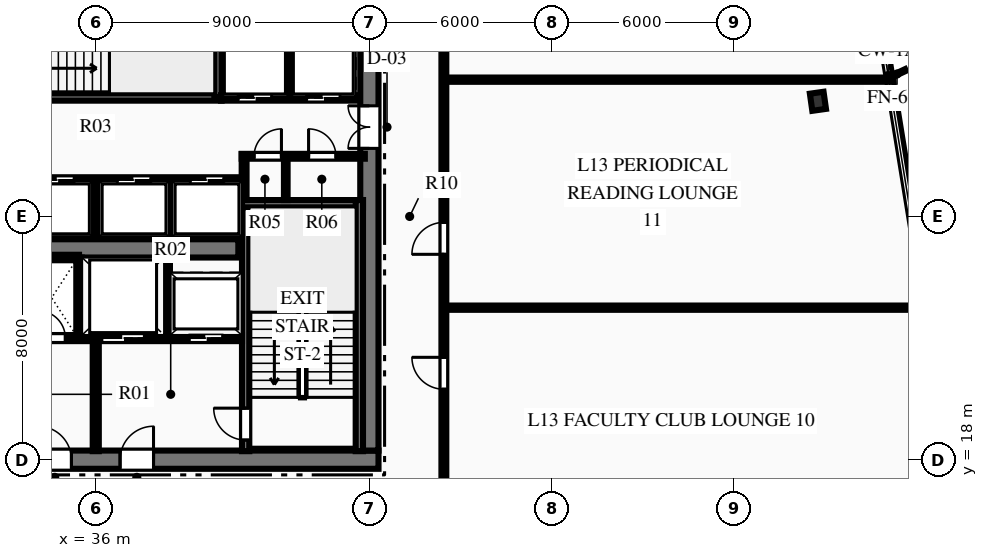
"""IFC4 building model, lengths in metres.
Left out: names, types, materials, properties, quantities, classifications, styles, units other than length and angle.
Written with IfcOpenShell. Run it as: python <this file> out.ifc"""

import sys

from ifc_helpers import new_model, si_unit, direction, frame, frame_2d, origin, origin_2d, place, context, subcontext, project, spatial, rectangle, i_section, extrude, element, fill, save


model = new_model("IFC4")
c1 = context("Model", 3, precision=1e-05, world=origin(), true_north=direction((0.0, 1.0)))
c2 = subcontext(c1, "Body", "Model", "MODEL_VIEW")
j1 = project(units=[si_unit("LENGTHUNIT", "METRE"), si_unit("PLANEANGLEUNIT", "RADIAN")], contexts=[c1])
p1 = place(None, origin())
s1 = spatial("IfcSite", under=j1, at=p1, CompositionType="ELEMENT")
p2 = place(p1, origin())
s2 = spatial("IfcBuilding", under=s1, at=p2, CompositionType="ELEMENT")
p3 = place(p2, frame((0.0, 0.0, 58.95)))
s3 = spatial("IfcBuildingStorey", under=s2, at=p3, CompositionType="ELEMENT", Elevation=58.95)
p4 = place(p3, frame((26.7, 18.0, 0.0), z_axis=(0.0, 0.0, 1.0), x_axis=(1.0, 0.0, 0.0)))
e1 = element("IfcWall", 1, at=p4, inside=s3, PredefinedType="SHEAR", context=c2, shape_type="SweptSolid", body=[
    extrude(rectangle(XDim=18.6, YDim=0.6, at=frame_2d((9.3, 0.0))), origin(), (0.0, 0.0, 1.0), 3.75),
])
p5 = place(p4, frame((7.4, 0.0, 0.0)))
e2 = element("IfcOpeningElement", 2, at=p5, cuts=e1, PredefinedType="OPENING", context=c2, shape_type="SweptSolid", body=[
    extrude(rectangle(XDim=1.1, YDim=2.15, at=frame_2d((0.55, 1.075))), frame((0.0, 0.31, 0.0), z_axis=(0.0, -1.0, 0.0), x_axis=(1.0, 0.0, 0.0)), (0.0, 0.0, 1.0), 0.62),
])
p6 = place(p4, frame((10.1, 0.0, 0.0)))
e3 = element("IfcOpeningElement", 3, at=p6, cuts=e1, PredefinedType="OPENING", context=c2, shape_type="SweptSolid", body=[
    extrude(rectangle(XDim=1.1, YDim=2.15, at=frame_2d((0.55, 1.075))), frame((0.0, 0.31, 0.0), z_axis=(0.0, -1.0, 0.0), x_axis=(1.0, 0.0, 0.0)), (0.0, 0.0, 1.0), 0.62),
])
p7 = place(p3, frame((45.0, 18.3, 0.0), z_axis=(0.0, 0.0, 1.0), x_axis=(0.0, 1.0, 0.0)))
e4 = element("IfcWall", 4, at=p7, inside=s3, PredefinedType="SHEAR", context=c2, shape_type="SweptSolid", body=[
    extrude(rectangle(XDim=15.4, YDim=0.6, at=frame_2d((7.7, 0.0))), origin(), (0.0, 0.0, 1.0), 3.75),
])
p8 = place(p7, frame((9.94, 0.0, 0.0)))
e5 = element("IfcOpeningElement", 5, at=p8, cuts=e4, PredefinedType="OPENING", context=c2, shape_type="SweptSolid", body=[
    extrude(rectangle(XDim=1.4, YDim=2.2, at=frame_2d((0.7, 1.1))), frame((0.0, 0.31, 0.0), z_axis=(0.0, -1.0, 0.0), x_axis=(1.0, 0.0, 0.0)), (0.0, 0.0, 1.0), 0.62),
])
p9 = place(p3, frame((31.31, 24.95, 0.0), z_axis=(0.0, 0.0, 1.0), x_axis=(1.0, 0.0, 0.0)))
e6 = element("IfcWall", 6, at=p9, inside=s3, PredefinedType="SHEAR", context=c2, shape_type="SweptSolid", body=[
    extrude(rectangle(XDim=9.38, YDim=0.6, at=frame_2d((4.69, 0.0))), origin(), (0.0, 0.0, 1.0), 3.75),
])
p10 = place(p3, frame((40.93, 18.28, 0.0), z_axis=(0.0, 0.0, 1.0), x_axis=(0.0, 1.0, 0.0)))
e7 = element("IfcWall", 7, at=p10, inside=s3, PredefinedType="SHEAR", context=c2, shape_type="SweptSolid", body=[
    extrude(rectangle(XDim=8.26, YDim=0.24, at=frame_2d((4.13, 0.0))), origin(), (0.0, 0.0, 1.0), 3.75),
])
p11 = place(p10, frame((0.365, 0.0, 0.0)))
e8 = element("IfcOpeningElement", 8, at=p11, cuts=e7, PredefinedType="OPENING", context=c2, shape_type="SweptSolid", body=[
    extrude(rectangle(XDim=1.05, YDim=2.15, at=frame_2d((0.525, 1.075))), frame((0.0, 0.13, 0.0), z_axis=(0.0, -1.0, 0.0), x_axis=(1.0, 0.0, 0.0)), (0.0, 0.0, 1.0), 0.26),
])
p12 = place(p3, frame((40.81, 26.42, 0.0), z_axis=(0.0, 0.0, 1.0), x_axis=(1.0, 0.0, 0.0)))
e9 = element("IfcWall", 9, at=p12, inside=s3, PredefinedType="SHEAR", context=c2, shape_type="SweptSolid", body=[
    extrude(rectangle(XDim=3.98, YDim=0.24, at=frame_2d((1.99, 0.0))), origin(), (0.0, 0.0, 1.0), 3.75),
])
p13 = place(p3, frame((44.67, 18.28, 0.0), z_axis=(0.0, 0.0, 1.0), x_axis=(0.0, 1.0, 0.0)))
e10 = element("IfcWall", 10, at=p13, inside=s3, PredefinedType="SHEAR", context=c2, shape_type="SweptSolid", body=[
    extrude(rectangle(XDim=8.26, YDim=0.24, at=frame_2d((4.13, 0.0))), origin(), (0.0, 0.0, 1.0), 3.75),
])
p14 = place(p3, frame((31.76, 29.93, 0.0), z_axis=(0.0, 0.0, 1.0), x_axis=(1.0, 0.0, 0.0)))
e11 = element("IfcWall", 11, at=p14, inside=s3, PredefinedType="SHEAR", context=c2, shape_type="SweptSolid", body=[
    extrude(rectangle(XDim=8.38, YDim=0.24, at=frame_2d((4.19, 0.0))), origin(), (0.0, 0.0, 1.0), 3.75),
])
p15 = place(p14, frame((0.565, 0.0, 0.0)))
e12 = element("IfcOpeningElement", 12, at=p15, cuts=e11, PredefinedType="OPENING", context=c2, shape_type="SweptSolid", body=[
    extrude(rectangle(XDim=1.05, YDim=2.15, at=frame_2d((0.525, 1.075))), frame((0.0, 0.13, 0.0), z_axis=(0.0, -1.0, 0.0), x_axis=(1.0, 0.0, 0.0)), (0.0, 0.0, 1.0), 0.26),
])
p16 = place(p3, frame((40.02, 29.93, 0.0), z_axis=(0.0, 0.0, 1.0), x_axis=(0.0, 1.0, 0.0)))
e13 = element("IfcWall", 13, at=p16, inside=s3, PredefinedType="SHEAR", context=c2, shape_type="SweptSolid", body=[
    extrude(rectangle(XDim=3.85, YDim=0.24, at=frame_2d((1.925, 0.0))), origin(), (0.0, 0.0, 1.0), 3.75),
])
p17 = place(p3, frame((59.753, 29.789, 0.0), z_axis=(0.0, 0.0, 1.0), x_axis=(0.990146240249, 0.140037219771, 0.0)))
e14 = element("IfcColumn", 14, at=p17, inside=s3, PredefinedType="COLUMN", context=c2, shape_type="SweptSolid", body=[
    extrude(i_section(OverallWidth=0.454, OverallDepth=0.569, WebThickness=0.078, FlangeThickness=0.125, at=origin_2d()), origin(), (0.0, 0.0, 1.0), 3.75),
])
p18 = place(p3, frame((36.0, 18.28, 0.0), z_axis=(0.0, 0.0, 1.0), x_axis=(0.0, 1.0, 0.0)))
e15 = element("IfcWall", 15, at=p18, inside=s3, PredefinedType="PARTITIONING", context=c2, shape_type="SweptSolid", body=[
    extrude(rectangle(XDim=3.77, YDim=0.2, at=frame_2d((1.885, 0.0))), origin(), (0.0, 0.0, 1.0), 3.44),
])
p19 = place(p3, frame((31.19, 22.0, 0.0), z_axis=(0.0, 0.0, 1.0), x_axis=(1.0, 0.0, 0.0)))
e16 = element("IfcWall", 16, at=p19, inside=s3, PredefinedType="PARTITIONING", context=c2, shape_type="SweptSolid", body=[
    extrude(rectangle(XDim=4.69, YDim=0.2, at=frame_2d((2.345, 0.0))), origin(), (0.0, 0.0, 1.0), 3.44),
])
p20 = place(p19, frame((2.91, 0.0, 0.0)))
e17 = element("IfcOpeningElement", 17, at=p20, cuts=e16, PredefinedType="OPENING", context=c2, shape_type="SweptSolid", body=[
    extrude(rectangle(XDim=0.9, YDim=2.15, at=frame_2d((0.45, 1.075))), frame((0.0, 0.11, 0.0), z_axis=(0.0, -1.0, 0.0), x_axis=(1.0, 0.0, 0.0)), (0.0, 0.0, 1.0), 0.22),
])
p21 = place(p19, frame((0.635, 0.0, 0.0)))
e18 = element("IfcOpeningElement", 18, at=p21, cuts=e16, PredefinedType="OPENING", context=c2, shape_type="SweptSolid", body=[
    extrude(rectangle(XDim=1.1, YDim=2.15, at=frame_2d((0.55, 1.075))), frame((0.0, 0.11, 0.0), z_axis=(0.0, -1.0, 0.0), x_axis=(1.0, 0.0, 0.0)), (0.0, 0.0, 1.0), 0.22),
])
p22 = place(p3, frame((36.12, 22.0, 0.0), z_axis=(0.0, 0.0, 1.0), x_axis=(1.0, 0.0, 0.0)))
e19 = element("IfcWall", 19, at=p22, inside=s3, PredefinedType="PARTITIONING", context=c2, shape_type="SweptSolid", body=[
    extrude(rectangle(XDim=4.69, YDim=0.2, at=frame_2d((2.345, 0.0))), origin(), (0.0, 0.0, 1.0), 3.44),
])
p23 = place(p22, frame((2.955, 0.0, 0.0)))
e20 = element("IfcOpeningElement", 20, at=p23, cuts=e19, PredefinedType="OPENING", context=c2, shape_type="SweptSolid", body=[
    extrude(rectangle(XDim=1.1, YDim=2.15, at=frame_2d((0.55, 1.075))), frame((0.0, 0.11, 0.0), z_axis=(0.0, -1.0, 0.0), x_axis=(1.0, 0.0, 0.0)), (0.0, 0.0, 1.0), 0.22),
])
p24 = place(p22, frame((0.08, 0.0, 0.0)))
e21 = element("IfcOpeningElement", 21, at=p24, cuts=e19, PredefinedType="OPENING", context=c2, shape_type="SweptSolid", body=[
    extrude(rectangle(XDim=1.4, YDim=2.2, at=frame_2d((0.7, 1.1))), frame((0.0, 0.11, 0.0), z_axis=(0.0, -1.0, 0.0), x_axis=(1.0, 0.0, 0.0)), (0.0, 0.0, 1.0), 0.22),
])
p25 = place(p3, frame((35.45, 22.05, 0.0), z_axis=(0.0, 0.0, 1.0), x_axis=(0.0, 1.0, 0.0)))
e22 = element("IfcWall", 22, at=p25, inside=s3, PredefinedType="PARTITIONING", context=c2, shape_type="SweptSolid", body=[
    extrude(rectangle(XDim=2.6, YDim=0.18, at=frame_2d((1.3, 0.0))), origin(), (0.0, 0.0, 1.0), 3.44),
])
p26 = place(p3, frame((33.65, 24.65, 0.0), z_axis=(0.0, 0.0, 1.0), x_axis=(1.0, 0.0, 0.0)))
e23 = element("IfcWall", 23, at=p26, inside=s3, PredefinedType="PARTITIONING", context=c2, shape_type="SweptSolid", body=[
    extrude(rectangle(XDim=1.8, YDim=0.18, at=frame_2d((0.9, 0.0))), origin(), (0.0, 0.0, 1.0), 3.44),
])
p27 = place(p3, frame((38.35, 22.05, 0.0), z_axis=(0.0, 0.0, 1.0), x_axis=(0.0, 1.0, 0.0)))
e24 = element("IfcWall", 24, at=p27, inside=s3, PredefinedType="PARTITIONING", context=c2, shape_type="SweptSolid", body=[
    extrude(rectangle(XDim=2.6, YDim=0.18, at=frame_2d((1.3, 0.0))), origin(), (0.0, 0.0, 1.0), 3.44),
])
p28 = place(p3, frame((40.8, 27.98, 0.0), z_axis=(0.0, 0.0, 1.0), x_axis=(1.0, 0.0, 0.0)))
e25 = element("IfcWall", 25, at=p28, inside=s3, PredefinedType="PARTITIONING", context=c2, shape_type="SweptSolid", body=[
    extrude(rectangle(XDim=4.05, YDim=0.16, at=frame_2d((2.025, 0.0))), origin(), (0.0, 0.0, 1.0), 3.44),
])
p29 = place(p28, frame((0.407, 0.0, 0.0)))
e26 = element("IfcOpeningElement", 26, at=p29, cuts=e25, PredefinedType="OPENING", context=c2, shape_type="SweptSolid", body=[
    extrude(rectangle(XDim=0.9, YDim=2.15, at=frame_2d((0.45, 1.075))), frame((0.0, 0.09, 0.0), z_axis=(0.0, -1.0, 0.0), x_axis=(1.0, 0.0, 0.0)), (0.0, 0.0, 1.0), 0.18),
])
p30 = place(p28, frame((2.2, 0.0, 0.0)))
e27 = element("IfcOpeningElement", 27, at=p30, cuts=e25, PredefinedType="OPENING", context=c2, shape_type="SweptSolid", body=[
    extrude(rectangle(XDim=0.9, YDim=2.15, at=frame_2d((0.45, 1.075))), frame((0.0, 0.09, 0.0), z_axis=(0.0, -1.0, 0.0), x_axis=(1.0, 0.0, 0.0)), (0.0, 0.0, 1.0), 0.18),
])
p31 = place(p3, frame((40.88, 26.54, 0.0), z_axis=(0.0, 0.0, 1.0), x_axis=(0.0, 1.0, 0.0)))
e28 = element("IfcWall", 28, at=p31, inside=s3, PredefinedType="PARTITIONING", context=c2, shape_type="SweptSolid", body=[
    extrude(rectangle(XDim=1.51, YDim=0.16, at=frame_2d((0.755, 0.0))), origin(), (0.0, 0.0, 1.0), 3.44),
])
p32 = place(p3, frame((42.25, 26.54, 0.0), z_axis=(0.0, 0.0, 1.0), x_axis=(0.0, 1.0, 0.0)))
e29 = element("IfcWall", 29, at=p32, inside=s3, PredefinedType="PARTITIONING", context=c2, shape_type="SweptSolid", body=[
    extrude(rectangle(XDim=1.44, YDim=0.12, at=frame_2d((0.72, 0.0))), origin(), (0.0, 0.0, 1.0), 3.44),
])
p33 = place(p3, frame((40.12, 29.9, 0.0), z_axis=(0.0, 0.0, 1.0), x_axis=(1.0, 0.0, 0.0)))
e30 = element("IfcWall", 30, at=p33, inside=s3, PredefinedType="PARTITIONING", context=c2, shape_type="SweptSolid", body=[
    extrude(rectangle(XDim=4.43, YDim=0.18, at=frame_2d((2.215, 0.0))), origin(), (0.0, 0.0, 1.0), 3.44),
])
p34 = place(p33, frame((0.565, 0.0, 0.0)))
e31 = element("IfcOpeningElement", 31, at=p34, cuts=e30, PredefinedType="OPENING", context=c2, shape_type="SweptSolid", body=[
    extrude(rectangle(XDim=1.1, YDim=2.15, at=frame_2d((0.55, 1.075))), frame((0.0, 0.1, 0.0), z_axis=(0.0, -1.0, 0.0), x_axis=(1.0, 0.0, 0.0)), (0.0, 0.0, 1.0), 0.2),
])
p35 = place(p33, frame((2.815, 0.0, 0.0)))
e32 = element("IfcOpeningElement", 32, at=p35, cuts=e30, PredefinedType="OPENING", context=c2, shape_type="SweptSolid", body=[
    extrude(rectangle(XDim=1.1, YDim=2.15, at=frame_2d((0.55, 1.075))), frame((0.0, 0.1, 0.0), z_axis=(0.0, -1.0, 0.0), x_axis=(1.0, 0.0, 0.0)), (0.0, 0.0, 1.0), 0.2),
])
p36 = place(p3, frame((42.37, 29.9, 0.0), z_axis=(0.0, 0.0, 1.0), x_axis=(0.0, 1.0, 0.0)))
e33 = element("IfcWall", 33, at=p36, inside=s3, PredefinedType="PARTITIONING", context=c2, shape_type="SweptSolid", body=[
    extrude(rectangle(XDim=3.75, YDim=0.18, at=frame_2d((1.875, 0.0))), origin(), (0.0, 0.0, 1.0), 3.44),
])
p37 = place(p3, frame((31.2, 27.2, 0.0), z_axis=(0.0, 0.0, 1.0), x_axis=(1.0, 0.0, 0.0)))
e34 = element("IfcWall", 34, at=p37, inside=s3, PredefinedType="PARTITIONING", context=c2, shape_type="SweptSolid", body=[
    extrude(rectangle(XDim=9.6, YDim=0.18, at=frame_2d((4.8, 0.0))), origin(), (0.0, 0.0, 1.0), 3.44),
])
p38 = place(p37, frame((0.59, 0.0, 0.0)))
e35 = element("IfcOpeningElement", 35, at=p38, cuts=e34, PredefinedType="OPENING", context=c2, shape_type="SweptSolid", body=[
    extrude(rectangle(XDim=1.1, YDim=2.15, at=frame_2d((0.55, 1.075))), frame((0.0, 0.1, 0.0), z_axis=(0.0, -1.0, 0.0), x_axis=(1.0, 0.0, 0.0)), (0.0, 0.0, 1.0), 0.2),
])
p39 = place(p37, frame((2.99, 0.0, 0.0)))
e36 = element("IfcOpeningElement", 36, at=p39, cuts=e34, PredefinedType="OPENING", context=c2, shape_type="SweptSolid", body=[
    extrude(rectangle(XDim=1.1, YDim=2.15, at=frame_2d((0.55, 1.075))), frame((0.0, 0.1, 0.0), z_axis=(0.0, -1.0, 0.0), x_axis=(1.0, 0.0, 0.0)), (0.0, 0.0, 1.0), 0.2),
])
p40 = place(p37, frame((5.51, 0.0, 0.0)))
e37 = element("IfcOpeningElement", 37, at=p40, cuts=e34, PredefinedType="OPENING", context=c2, shape_type="SweptSolid", body=[
    extrude(rectangle(XDim=1.1, YDim=2.15, at=frame_2d((0.55, 1.075))), frame((0.0, 0.1, 0.0), z_axis=(0.0, -1.0, 0.0), x_axis=(1.0, 0.0, 0.0)), (0.0, 0.0, 1.0), 0.2),
])
p41 = place(p37, frame((7.91, 0.0, 0.0)))
e38 = element("IfcOpeningElement", 38, at=p41, cuts=e34, PredefinedType="OPENING", context=c2, shape_type="SweptSolid", body=[
    extrude(rectangle(XDim=1.1, YDim=2.15, at=frame_2d((0.55, 1.075))), frame((0.0, 0.1, 0.0), z_axis=(0.0, -1.0, 0.0), x_axis=(1.0, 0.0, 0.0)), (0.0, 0.0, 1.0), 0.2),
])
for number, where, z_axis, x_axis in (
    (39, (36.0, 25.3, 0.0), (0.0, 0.0, 1.0), (0.0, 1.0, 0.0)),
    (40, (38.46, 25.3, 0.0), (0.0, 0.0, 1.0), (0.0, 1.0, 0.0)),
):
    element("IfcWall", number, at=place(p3, frame(where, z_axis=z_axis, x_axis=x_axis)), inside=s3, PredefinedType="PARTITIONING", context=c2, shape_type="SweptSolid", body=[
        extrude(rectangle(XDim=1.9, YDim=0.18, at=frame_2d((0.95, 0.0))), origin(), (0.0, 0.0, 1.0), 3.44),
    ])
p42 = place(p3, frame((47.45, 15.55, 0.0), z_axis=(0.0, 0.0, 1.0), x_axis=(0.0, 1.0, 0.0)))
e41 = element("IfcWall", 41, at=p42, inside=s3, PredefinedType="PARTITIONING", context=c2, shape_type="SweptSolid", body=[
    extrude(rectangle(XDim=20.9, YDim=0.16, at=frame_2d((10.45, 0.0))), origin(), (0.0, 0.0, 1.0), 3.44),
])
p43 = place(p42, frame((4.767, 0.0, 0.0)))
e42 = element("IfcOpeningElement", 42, at=p43, cuts=e41, PredefinedType="OPENING", context=c2, shape_type="SweptSolid", body=[
    extrude(rectangle(XDim=1.05, YDim=2.15, at=frame_2d((0.525, 1.075))), frame((0.0, 0.09, 0.0), z_axis=(0.0, -1.0, 0.0), x_axis=(1.0, 0.0, 0.0)), (0.0, 0.0, 1.0), 0.18),
])
p44 = place(p42, frame((9.205, 0.0, 0.0)))
e43 = element("IfcOpeningElement", 43, at=p44, cuts=e41, PredefinedType="OPENING", context=c2, shape_type="SweptSolid", body=[
    extrude(rectangle(XDim=1.05, YDim=2.15, at=frame_2d((0.525, 1.075))), frame((0.0, 0.09, 0.0), z_axis=(0.0, -1.0, 0.0), x_axis=(1.0, 0.0, 0.0)), (0.0, 0.0, 1.0), 0.18),
])
p45 = place(p42, frame((18.365, 0.0, 0.0)))
e44 = element("IfcOpeningElement", 44, at=p45, cuts=e41, PredefinedType="OPENING", context=c2, shape_type="SweptSolid", body=[
    extrude(rectangle(XDim=1.05, YDim=2.15, at=frame_2d((0.525, 1.075))), frame((0.0, 0.09, 0.0), z_axis=(0.0, -1.0, 0.0), x_axis=(1.0, 0.0, 0.0)), (0.0, 0.0, 1.0), 0.18),
])
p46 = place(p3, frame((47.45, 23.0, 0.0), z_axis=(0.0, 0.0, 1.0), x_axis=(1.0, 0.0, 0.0)))
e45 = element("IfcWall", 45, at=p46, inside=s3, PredefinedType="PARTITIONING", context=c2, shape_type="SweptSolid", body=[
    extrude(rectangle(XDim=15.993, YDim=0.14, at=frame_2d((7.996, 0.0))), origin(), (0.0, 0.0, 1.0), 3.44),
])
p47 = place(p3, frame((47.45, 30.5, 0.0), z_axis=(0.0, 0.0, 1.0), x_axis=(1.0, 0.0, 0.0)))
e46 = element("IfcWall", 46, at=p47, inside=s3, PredefinedType="PARTITIONING", context=c2, shape_type="SweptSolid", body=[
    extrude(rectangle(XDim=14.778, YDim=0.14, at=frame_2d((7.389, 0.0))), origin(), (0.0, 0.0, 1.0), 3.44),
])
p48 = place(p29, origin())
e47 = element("IfcDoor", 47, at=p48, inside=s3, OperationType="SINGLE_SWING_RIGHT", PredefinedType="DOOR", context=c2, shape_type="SweptSolid", body=[
    extrude(rectangle(XDim=0.9, YDim=2.15, at=frame_2d((0.45, 1.075))), frame((0.0, 0.025, 0.0), z_axis=(0.0, -1.0, 0.0), x_axis=(1.0, 0.0, 0.0)), (0.0, 0.0, 1.0), 0.05),
])
fill(e26, e47)
p49 = place(p30, origin())
e48 = element("IfcDoor", 48, at=p49, inside=s3, OperationType="SINGLE_SWING_LEFT", PredefinedType="DOOR", context=c2, shape_type="SweptSolid", body=[
    extrude(rectangle(XDim=0.9, YDim=2.15, at=frame_2d((0.45, 1.075))), frame((0.0, 0.025, 0.0), z_axis=(0.0, -1.0, 0.0), x_axis=(1.0, 0.0, 0.0)), (0.0, 0.0, 1.0), 0.05),
])
fill(e27, e48)
p50 = place(p11, origin())
e49 = element("IfcDoor", 49, at=p50, inside=s3, OperationType="SINGLE_SWING_RIGHT", PredefinedType="DOOR", context=c2, shape_type="SweptSolid", body=[
    extrude(rectangle(XDim=1.05, YDim=2.15, at=frame_2d((0.525, 1.075))), frame((0.0, 0.025, 0.0), z_axis=(0.0, -1.0, 0.0), x_axis=(1.0, 0.0, 0.0)), (0.0, 0.0, 1.0), 0.05),
])
fill(e8, e49)
p51 = place(p5, origin())
e50 = element("IfcDoor", 50, at=p51, inside=s3, OperationType="SINGLE_SWING_LEFT", PredefinedType="DOOR", context=c2, shape_type="SweptSolid", body=[
    extrude(rectangle(XDim=1.1, YDim=2.15, at=frame_2d((0.55, 1.075))), frame((0.0, 0.025, 0.0), z_axis=(0.0, -1.0, 0.0), x_axis=(1.0, 0.0, 0.0)), (0.0, 0.0, 1.0), 0.05),
])
fill(e2, e50)
p52 = place(p6, origin())
e51 = element("IfcDoor", 51, at=p52, inside=s3, OperationType="SINGLE_SWING_RIGHT", PredefinedType="DOOR", context=c2, shape_type="SweptSolid", body=[
    extrude(rectangle(XDim=1.1, YDim=2.15, at=frame_2d((0.55, 1.075))), frame((0.0, 0.025, 0.0), z_axis=(0.0, -1.0, 0.0), x_axis=(1.0, 0.0, 0.0)), (0.0, 0.0, 1.0), 0.05),
])
fill(e3, e51)
p53 = place(p20, origin())
e52 = element("IfcDoor", 52, at=p53, inside=s3, OperationType="SINGLE_SWING_LEFT", PredefinedType="DOOR", context=c2, shape_type="SweptSolid", body=[
    extrude(rectangle(XDim=0.9, YDim=2.15, at=frame_2d((0.45, 1.075))), frame((0.0, 0.025, 0.0), z_axis=(0.0, -1.0, 0.0), x_axis=(1.0, 0.0, 0.0)), (0.0, 0.0, 1.0), 0.05),
])
fill(e17, e52)
p54 = place(p8, origin())
e53 = element("IfcDoor", 53, at=p54, inside=s3, OperationType="DOUBLE_DOOR_SINGLE_SWING", PredefinedType="DOOR", context=c2, shape_type="SweptSolid", body=[
    extrude(rectangle(XDim=1.4, YDim=2.2, at=frame_2d((0.7, 1.1))), frame((0.0, 0.025, 0.0), z_axis=(0.0, -1.0, 0.0), x_axis=(1.0, 0.0, 0.0)), (0.0, 0.0, 1.0), 0.05),
])
fill(e5, e53)
p55 = place(p43, origin())
e54 = element("IfcDoor", 54, at=p55, inside=s3, OperationType="SINGLE_SWING_RIGHT", PredefinedType="DOOR", context=c2, shape_type="SweptSolid", body=[
    extrude(rectangle(XDim=1.05, YDim=2.15, at=frame_2d((0.525, 1.075))), frame((0.0, 0.025, 0.0), z_axis=(0.0, -1.0, 0.0), x_axis=(1.0, 0.0, 0.0)), (0.0, 0.0, 1.0), 0.05),
])
fill(e42, e54)
p56 = place(p44, origin())
e55 = element("IfcDoor", 55, at=p56, inside=s3, OperationType="SINGLE_SWING_LEFT", PredefinedType="DOOR", context=c2, shape_type="SweptSolid", body=[
    extrude(rectangle(XDim=1.05, YDim=2.15, at=frame_2d((0.525, 1.075))), frame((0.0, 0.025, 0.0), z_axis=(0.0, -1.0, 0.0), x_axis=(1.0, 0.0, 0.0)), (0.0, 0.0, 1.0), 0.05),
])
fill(e43, e55)
p57 = place(p34, origin())
e56 = element("IfcDoor", 56, at=p57, inside=s3, OperationType="SLIDING_TO_LEFT", PredefinedType="DOOR", context=c2, shape_type="SweptSolid", body=[
    extrude(rectangle(XDim=1.1, YDim=2.15, at=frame_2d((0.55, 1.075))), frame((0.0, 0.025, 0.0), z_axis=(0.0, -1.0, 0.0), x_axis=(1.0, 0.0, 0.0)), (0.0, 0.0, 1.0), 0.05),
])
fill(e31, e56)
p58 = place(p35, origin())
e57 = element("IfcDoor", 57, at=p58, inside=s3, OperationType="SLIDING_TO_LEFT", PredefinedType="DOOR", context=c2, shape_type="SweptSolid", body=[
    extrude(rectangle(XDim=1.1, YDim=2.15, at=frame_2d((0.55, 1.075))), frame((0.0, 0.025, 0.0), z_axis=(0.0, -1.0, 0.0), x_axis=(1.0, 0.0, 0.0)), (0.0, 0.0, 1.0), 0.05),
])
fill(e32, e57)
p59 = place(p39, origin())
e58 = element("IfcDoor", 58, at=p59, inside=s3, OperationType="SLIDING_TO_LEFT", PredefinedType="DOOR", context=c2, shape_type="SweptSolid", body=[
    extrude(rectangle(XDim=1.1, YDim=2.15, at=frame_2d((0.55, 1.075))), frame((0.0, 0.025, 0.0), z_axis=(0.0, -1.0, 0.0), x_axis=(1.0, 0.0, 0.0)), (0.0, 0.0, 1.0), 0.05),
])
fill(e36, e58)
p60 = place(p40, origin())
e59 = element("IfcDoor", 59, at=p60, inside=s3, OperationType="SLIDING_TO_LEFT", PredefinedType="DOOR", context=c2, shape_type="SweptSolid", body=[
    extrude(rectangle(XDim=1.1, YDim=2.15, at=frame_2d((0.55, 1.075))), frame((0.0, 0.025, 0.0), z_axis=(0.0, -1.0, 0.0), x_axis=(1.0, 0.0, 0.0)), (0.0, 0.0, 1.0), 0.05),
])
fill(e37, e59)
p61 = place(p41, origin())
e60 = element("IfcDoor", 60, at=p61, inside=s3, OperationType="SLIDING_TO_LEFT", PredefinedType="DOOR", context=c2, shape_type="SweptSolid", body=[
    extrude(rectangle(XDim=1.1, YDim=2.15, at=frame_2d((0.55, 1.075))), frame((0.0, 0.025, 0.0), z_axis=(0.0, -1.0, 0.0), x_axis=(1.0, 0.0, 0.0)), (0.0, 0.0, 1.0), 0.05),
])
fill(e38, e60)
p62 = place(p23, origin())
e61 = element("IfcDoor", 61, at=p62, inside=s3, OperationType="SLIDING_TO_LEFT", PredefinedType="DOOR", context=c2, shape_type="SweptSolid", body=[
    extrude(rectangle(XDim=1.1, YDim=2.15, at=frame_2d((0.55, 1.075))), frame((0.0, 0.025, 0.0), z_axis=(0.0, -1.0, 0.0), x_axis=(1.0, 0.0, 0.0)), (0.0, 0.0, 1.0), 0.05),
])
fill(e20, e61)
p63 = place(p24, origin())
e62 = element("IfcDoor", 62, at=p63, inside=s3, OperationType="SLIDING_TO_LEFT", PredefinedType="DOOR", context=c2, shape_type="SweptSolid", body=[
    extrude(rectangle(XDim=1.4, YDim=2.2, at=frame_2d((0.7, 1.1))), frame((0.0, 0.025, 0.0), z_axis=(0.0, -1.0, 0.0), x_axis=(1.0, 0.0, 0.0)), (0.0, 0.0, 1.0), 0.05),
])
fill(e21, e62)
save(model, sys.argv[1])
